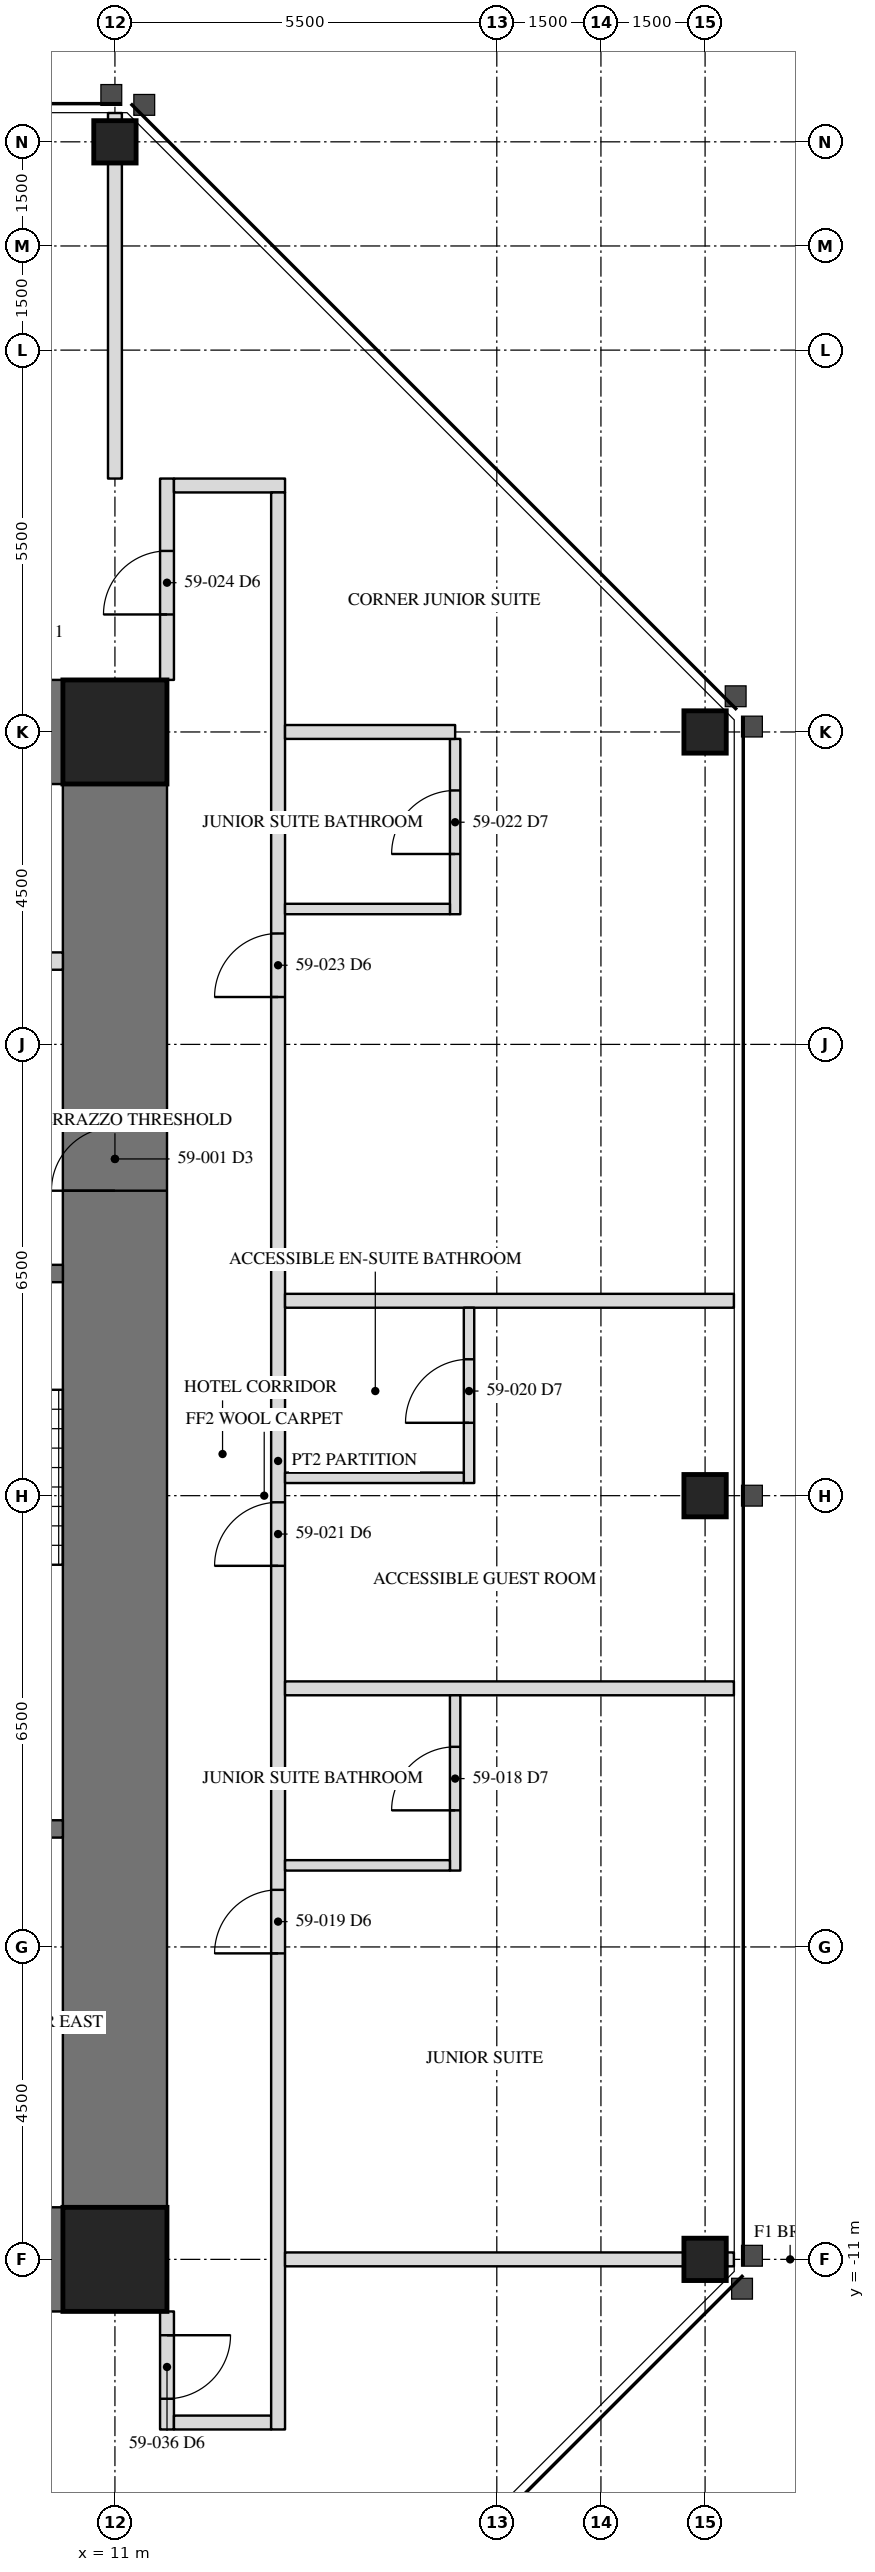
"""IFC4 building model, lengths in metres.
Left out: names, types, materials, properties, quantities, classifications, styles, units other than length and angle.
Written with IfcOpenShell. Run it as: python <this file> out.ifc"""

import sys

from ifc_helpers import new_model, si_unit, direction, frame, frame_2d, origin, origin_2d, place, context, subcontext, project, spatial, rectangle, hollow_rectangle, extrude, element, fill, save


model = new_model("IFC4")
c1 = context("Model", 3, precision=1e-05, world=origin(), true_north=direction((0.0, 1.0)))
c2 = subcontext(c1, "Body", "Model", "MODEL_VIEW")
j1 = project(units=[si_unit("LENGTHUNIT", "METRE"), si_unit("PLANEANGLEUNIT", "RADIAN")], contexts=[c1])
p1 = place(None, origin())
s1 = spatial("IfcSite", under=j1, at=p1, CompositionType="ELEMENT")
p2 = place(p1, origin())
s2 = spatial("IfcBuilding", under=s1, at=p2, CompositionType="ELEMENT")
p3 = place(p2, frame((0.0, 0.0, 243.2)))
s3 = spatial("IfcBuildingStorey", under=s2, at=p3, CompositionType="ELEMENT", Elevation=243.2)
for number, where, z_axis, x_axis in (
    (1, (19.5, -11.0, 0.0), (0.0, 0.0, 1.0), (0.0, 1.0, 0.0)),
    (2, (19.5, 0.0, 0.0), (0.0, 0.0, 1.0), (0.0, 1.0, 0.0)),
    (3, (19.5, 11.0, 0.0), (0.0, 0.0, 1.0), (0.0, 1.0, 0.0)),
    (4, (11.0, 19.5, 0.0), (0.0, 0.0, 1.0), (1.0, 0.0, 0.0)),
):
    element("IfcColumn", number, at=place(p3, frame(where, z_axis=z_axis, x_axis=x_axis)), inside=s3, PredefinedType="COLUMN", context=c2, shape_type="SweptSolid", body=[
        extrude(hollow_rectangle(XDim=0.61, YDim=0.61, WallThickness=0.051, at=origin_2d()), origin(), (0.0, 0.0, 1.0), 3.5),
    ])
p4 = place(p3, frame((11.0, -11.0, 0.0), z_axis=(0.0, 0.0, 1.0), x_axis=(0.0, 1.0, 0.0)))
e5 = element("IfcWall", 5, at=p4, inside=s3, PredefinedType="SHEAR", context=c2, shape_type="SweptSolid", body=[
    extrude(rectangle(XDim=22.0, YDim=1.5, at=frame_2d((11.0, 0.0))), origin(), (0.0, 0.0, 1.0), 3.5),
])
p5 = place(p4, frame((15.393, 0.0, 0.0)))
e6 = element("IfcOpeningElement", 6, at=p5, cuts=e5, PredefinedType="OPENING", context=c2, shape_type="SweptSolid", body=[
    extrude(rectangle(XDim=0.915, YDim=2.134, at=frame_2d((0.458, 1.067))), frame((0.0, 0.76, 0.0), z_axis=(0.0, -1.0, 0.0), x_axis=(1.0, 0.0, 0.0)), (0.0, 0.0, 1.0), 1.52),
])
for number, where, z_axis, x_axis in (
    (7, (11.0, 11.0, 0.0), (0.0, 0.0, 1.0), (-1.0, 0.0, 0.0)),
    (8, (6.5, -11.0, 0.0), (0.0, 0.0, 1.0), (1.0, 0.0, 0.0)),
):
    element("IfcWall", number, at=place(p3, frame(where, z_axis=z_axis, x_axis=x_axis)), inside=s3, PredefinedType="SHEAR", context=c2, shape_type="SweptSolid", body=[
        extrude(rectangle(XDim=4.5, YDim=1.5, at=frame_2d((2.25, 0.0))), origin(), (0.0, 0.0, 1.0), 3.5),
    ])
for number, where, z_axis, x_axis in (
    (9, (11.0, 11.0, 0.0), (0.0, 0.0, 1.0), (1.0, 0.0, 0.0)),
    (10, (11.0, -11.0, 0.0), (0.0, 0.0, 1.0), (1.0, 0.0, 0.0)),
):
    element("IfcColumn", number, at=place(p3, frame(where, z_axis=z_axis, x_axis=x_axis)), inside=s3, PredefinedType="COLUMN", context=c2, shape_type="SweptSolid", body=[
        extrude(hollow_rectangle(XDim=1.499, YDim=1.499, WallThickness=0.102, at=origin_2d()), origin(), (0.0, 0.0, 1.0), 3.5),
    ])
p6 = place(p3, frame((6.95, -4.8, 0.0), z_axis=(0.0, 0.0, 1.0), x_axis=(1.0, 0.0, 0.0)))
e11 = element("IfcWall", 11, at=p6, inside=s3, PredefinedType="SOLIDWALL", context=c2, shape_type="SweptSolid", body=[
    extrude(rectangle(XDim=3.3, YDim=0.25, at=frame_2d((1.65, 0.0))), origin(), (0.0, 0.0, 1.0), 3.31),
])
p7 = place(p3, frame((6.95, 3.2, 0.0), z_axis=(0.0, 0.0, 1.0), x_axis=(1.0, 0.0, 0.0)))
e12 = element("IfcWall", 12, at=p7, inside=s3, PredefinedType="SOLIDWALL", context=c2, shape_type="SweptSolid", body=[
    extrude(rectangle(XDim=3.3, YDim=0.25, at=frame_2d((1.65, 0.0))), origin(), (0.0, 0.0, 1.0), 3.31),
])
p8 = place(p7, frame((1.116, 0.0, 0.0)))
e13 = element("IfcOpeningElement", 13, at=p8, cuts=e12, PredefinedType="OPENING", context=c2, shape_type="SweptSolid", body=[
    extrude(rectangle(XDim=1.067, YDim=2.134, at=frame_2d((0.533, 1.067))), frame((0.0, 0.135, 0.0), z_axis=(0.0, -1.0, 0.0), x_axis=(1.0, 0.0, 0.0)), (0.0, 0.0, 1.0), 0.27),
])
p9 = place(p3, frame((6.95, 7.7, 0.0), z_axis=(0.0, 0.0, 1.0), x_axis=(1.0, 0.0, 0.0)))
e14 = element("IfcWall", 14, at=p9, inside=s3, PredefinedType="PARTITIONING", context=c2, shape_type="SweptSolid", body=[
    extrude(rectangle(XDim=3.3, YDim=0.25, at=frame_2d((1.65, 0.0))), origin(), (0.0, 0.0, 1.0), 3.31),
])
p10 = place(p9, frame((0.45, 0.0, 0.0)))
e15 = element("IfcOpeningElement", 15, at=p10, cuts=e14, PredefinedType="OPENING", context=c2, shape_type="SweptSolid", body=[
    extrude(rectangle(XDim=1.219, YDim=2.134, at=frame_2d((0.609, 1.067))), frame((0.0, 0.135, 0.0), z_axis=(0.0, -1.0, 0.0), x_axis=(1.0, 0.0, 0.0)), (0.0, 0.0, 1.0), 0.27),
])
p11 = place(p3, frame((11.75, 11.75, 0.0), z_axis=(0.0, 0.0, 1.0), x_axis=(0.0, 1.0, 0.0)))
e16 = element("IfcWall", 16, at=p11, inside=s3, PredefinedType="PARTITIONING", context=c2, shape_type="SweptSolid", body=[
    extrude(rectangle(XDim=2.9, YDim=0.2, at=frame_2d((1.45, 0.0))), origin(), (0.0, 0.0, 1.0), 3.31),
])
p12 = place(p11, frame((0.942, 0.0, 0.0)))
e17 = element("IfcOpeningElement", 17, at=p12, cuts=e16, PredefinedType="OPENING", context=c2, shape_type="SweptSolid", body=[
    extrude(rectangle(XDim=0.915, YDim=2.134, at=frame_2d((0.458, 1.067))), frame((0.0, 0.11, 0.0), z_axis=(0.0, -1.0, 0.0), x_axis=(1.0, 0.0, 0.0)), (0.0, 0.0, 1.0), 0.22),
])
p13 = place(p3, frame((13.45, 14.55, 0.0), z_axis=(0.0, 0.0, 1.0), x_axis=(-1.0, 0.0, 0.0)))
e18 = element("IfcWall", 18, at=p13, inside=s3, PredefinedType="PARTITIONING", context=c2, shape_type="SweptSolid", body=[
    extrude(rectangle(XDim=1.6, YDim=0.2, at=frame_2d((0.8, 0.0))), origin(), (0.0, 0.0, 1.0), 3.31),
])
p14 = place(p3, frame((11.75, -11.75, 0.0), z_axis=(0.0, 0.0, 1.0), x_axis=(0.0, -1.0, 0.0)))
e19 = element("IfcWall", 19, at=p14, inside=s3, PredefinedType="PARTITIONING", context=c2, shape_type="SweptSolid", body=[
    extrude(rectangle(XDim=1.7, YDim=0.2, at=frame_2d((0.85, 0.0))), origin(), (0.0, 0.0, 1.0), 3.31),
])
p15 = place(p14, frame((0.343, 0.0, 0.0)))
e20 = element("IfcOpeningElement", 20, at=p15, cuts=e19, PredefinedType="OPENING", context=c2, shape_type="SweptSolid", body=[
    extrude(rectangle(XDim=0.915, YDim=2.134, at=frame_2d((0.458, 1.067))), frame((0.0, 0.11, 0.0), z_axis=(0.0, -1.0, 0.0), x_axis=(1.0, 0.0, 0.0)), (0.0, 0.0, 1.0), 0.22),
])
p16 = place(p3, frame((11.85, -13.35, 0.0), z_axis=(0.0, 0.0, 1.0), x_axis=(1.0, 0.0, 0.0)))
e21 = element("IfcWall", 21, at=p16, inside=s3, PredefinedType="PARTITIONING", context=c2, shape_type="SweptSolid", body=[
    extrude(rectangle(XDim=1.4, YDim=0.2, at=frame_2d((0.7, 0.0))), origin(), (0.0, 0.0, 1.0), 3.31),
])
p17 = place(p3, frame((13.35, -13.45, 0.0), z_axis=(0.0, 0.0, 1.0), x_axis=(0.0, 1.0, 0.0)))
e22 = element("IfcWall", 22, at=p17, inside=s3, PredefinedType="PARTITIONING", context=c2, shape_type="SweptSolid", body=[
    extrude(rectangle(XDim=27.9, YDim=0.2, at=frame_2d((13.95, 0.0))), origin(), (0.0, 0.0, 1.0), 3.31),
])
p18 = place(p17, frame((6.857, 0.0, 0.0)))
e23 = element("IfcOpeningElement", 23, at=p18, cuts=e22, PredefinedType="OPENING", context=c2, shape_type="SweptSolid", body=[
    extrude(rectangle(XDim=0.915, YDim=2.134, at=frame_2d((0.458, 1.067))), frame((0.0, 0.11, 0.0), z_axis=(0.0, -1.0, 0.0), x_axis=(1.0, 0.0, 0.0)), (0.0, 0.0, 1.0), 0.22),
])
p19 = place(p17, frame((12.439, 0.0, 0.0)))
e24 = element("IfcOpeningElement", 24, at=p19, cuts=e22, PredefinedType="OPENING", context=c2, shape_type="SweptSolid", body=[
    extrude(rectangle(XDim=0.915, YDim=2.134, at=frame_2d((0.458, 1.067))), frame((0.0, 0.11, 0.0), z_axis=(0.0, -1.0, 0.0), x_axis=(1.0, 0.0, 0.0)), (0.0, 0.0, 1.0), 0.22),
])
p20 = place(p17, frame((20.633, 0.0, 0.0)))
e25 = element("IfcOpeningElement", 25, at=p20, cuts=e22, PredefinedType="OPENING", context=c2, shape_type="SweptSolid", body=[
    extrude(rectangle(XDim=0.915, YDim=2.134, at=frame_2d((0.458, 1.067))), frame((0.0, 0.11, 0.0), z_axis=(0.0, -1.0, 0.0), x_axis=(1.0, 0.0, 0.0)), (0.0, 0.0, 1.0), 0.22),
])
p21 = place(p3, frame((13.45, -11.0, 0.0), z_axis=(0.0, 0.0, 1.0), x_axis=(1.0, 0.0, 0.0)))
e26 = element("IfcWall", 26, at=p21, inside=s3, PredefinedType="PARTITIONING", context=c2, shape_type="SweptSolid", body=[
    extrude(rectangle(XDim=6.465, YDim=0.2, at=frame_2d((3.232, 0.0))), origin(), (0.0, 0.0, 1.0), 2.802),
])
for number, where, z_axis, x_axis in (
    (27, (13.45, -2.775, 0.0), (0.0, 0.0, 1.0), (1.0, 0.0, 0.0)),
    (28, (13.45, 2.807, 0.0), (0.0, 0.0, 1.0), (1.0, 0.0, 0.0)),
):
    element("IfcWall", number, at=place(p3, frame(where, z_axis=z_axis, x_axis=x_axis)), inside=s3, PredefinedType="PARTITIONING", context=c2, shape_type="SweptSolid", body=[
        extrude(rectangle(XDim=6.465, YDim=0.2, at=frame_2d((3.232, 0.0))), origin(), (0.0, 0.0, 1.0), 3.31),
    ])
p22 = place(p3, frame((15.9, -5.4, 0.0), z_axis=(0.0, 0.0, 1.0), x_axis=(0.0, 1.0, 0.0)))
e29 = element("IfcWall", 29, at=p22, inside=s3, PredefinedType="PARTITIONING", context=c2, shape_type="SweptSolid", body=[
    extrude(rectangle(XDim=2.525, YDim=0.15, at=frame_2d((1.262, 0.0))), origin(), (0.0, 0.0, 1.0), 3.31),
])
p23 = place(p22, frame((0.867, 0.0, 0.0)))
e30 = element("IfcOpeningElement", 30, at=p23, cuts=e29, PredefinedType="OPENING", context=c2, shape_type="SweptSolid", body=[
    extrude(rectangle(XDim=0.915, YDim=2.032, at=frame_2d((0.458, 1.016))), frame((0.0, 0.085, 0.0), z_axis=(0.0, -1.0, 0.0), x_axis=(1.0, 0.0, 0.0)), (0.0, 0.0, 1.0), 0.17),
])
p24 = place(p3, frame((13.45, -5.325, 0.0), z_axis=(0.0, 0.0, 1.0), x_axis=(1.0, 0.0, 0.0)))
e31 = element("IfcWall", 31, at=p24, inside=s3, PredefinedType="PARTITIONING", context=c2, shape_type="SweptSolid", body=[
    extrude(rectangle(XDim=2.375, YDim=0.15, at=frame_2d((1.188, 0.0))), origin(), (0.0, 0.0, 1.0), 3.31),
])
p25 = place(p3, frame((16.1, 0.182, 0.0), z_axis=(0.0, 0.0, 1.0), x_axis=(0.0, 1.0, 0.0)))
e32 = element("IfcWall", 32, at=p25, inside=s3, PredefinedType="PARTITIONING", context=c2, shape_type="SweptSolid", body=[
    extrude(rectangle(XDim=2.525, YDim=0.15, at=frame_2d((1.263, 0.0))), origin(), (0.0, 0.0, 1.0), 3.31),
])
p26 = place(p25, frame((0.867, 0.0, 0.0)))
e33 = element("IfcOpeningElement", 33, at=p26, cuts=e32, PredefinedType="OPENING", context=c2, shape_type="SweptSolid", body=[
    extrude(rectangle(XDim=0.915, YDim=2.032, at=frame_2d((0.458, 1.016))), frame((0.0, 0.085, 0.0), z_axis=(0.0, -1.0, 0.0), x_axis=(1.0, 0.0, 0.0)), (0.0, 0.0, 1.0), 0.17),
])
p27 = place(p3, frame((13.45, 0.257, 0.0), z_axis=(0.0, 0.0, 1.0), x_axis=(1.0, 0.0, 0.0)))
e34 = element("IfcWall", 34, at=p27, inside=s3, PredefinedType="PARTITIONING", context=c2, shape_type="SweptSolid", body=[
    extrude(rectangle(XDim=2.575, YDim=0.15, at=frame_2d((1.288, 0.0))), origin(), (0.0, 0.0, 1.0), 3.31),
])
p28 = place(p3, frame((15.9, 8.375, 0.0), z_axis=(0.0, 0.0, 1.0), x_axis=(0.0, 1.0, 0.0)))
e35 = element("IfcWall", 35, at=p28, inside=s3, PredefinedType="PARTITIONING", context=c2, shape_type="SweptSolid", body=[
    extrude(rectangle(XDim=2.525, YDim=0.15, at=frame_2d((1.262, 0.0))), origin(), (0.0, 0.0, 1.0), 3.31),
])
p29 = place(p28, frame((0.867, 0.0, 0.0)))
e36 = element("IfcOpeningElement", 36, at=p29, cuts=e35, PredefinedType="OPENING", context=c2, shape_type="SweptSolid", body=[
    extrude(rectangle(XDim=0.915, YDim=2.032, at=frame_2d((0.458, 1.016))), frame((0.0, 0.085, 0.0), z_axis=(0.0, -1.0, 0.0), x_axis=(1.0, 0.0, 0.0)), (0.0, 0.0, 1.0), 0.17),
])
p30 = place(p3, frame((13.45, 8.45, 0.0), z_axis=(0.0, 0.0, 1.0), x_axis=(1.0, 0.0, 0.0)))
e37 = element("IfcWall", 37, at=p30, inside=s3, PredefinedType="PARTITIONING", context=c2, shape_type="SweptSolid", body=[
    extrude(rectangle(XDim=2.375, YDim=0.15, at=frame_2d((1.188, 0.0))), origin(), (0.0, 0.0, 1.0), 3.31),
])
p31 = place(p3, frame((13.45, 11.0, 0.0), z_axis=(0.0, 0.0, 1.0), x_axis=(1.0, 0.0, 0.0)))
e38 = element("IfcWall", 38, at=p31, inside=s3, PredefinedType="PARTITIONING", context=c2, shape_type="SweptSolid", body=[
    extrude(rectangle(XDim=2.45, YDim=0.2, at=frame_2d((1.225, 0.0))), origin(), (0.0, 0.0, 1.0), 2.802),
])
p32 = place(p3, frame((11.0, 14.65, 0.0), z_axis=(0.0, 0.0, 1.0), x_axis=(0.0, 1.0, 0.0)))
e39 = element("IfcWall", 39, at=p32, inside=s3, PredefinedType="PARTITIONING", context=c2, shape_type="SweptSolid", body=[
    extrude(rectangle(XDim=5.265, YDim=0.2, at=frame_2d((2.633, 0.0))), origin(), (0.0, 0.0, 1.0), 2.802),
])
p33 = place(p5, origin())
e40 = element("IfcDoor", 40, at=p33, inside=s3, OperationType="SINGLE_SWING_RIGHT", PredefinedType="DOOR", context=c2, shape_type="SweptSolid", body=[
    extrude(rectangle(XDim=0.915, YDim=2.134, at=frame_2d((0.458, 1.067))), frame((0.0, -0.675, 0.0), z_axis=(0.0, -1.0, 0.0), x_axis=(1.0, 0.0, 0.0)), (0.0, 0.0, 1.0), 0.05),
])
fill(e6, e40)
p34 = place(p23, origin())
e41 = element("IfcDoor", 41, at=p34, inside=s3, OperationType="SINGLE_SWING_LEFT", PredefinedType="DOOR", context=c2, shape_type="SweptSolid", body=[
    extrude(rectangle(XDim=0.915, YDim=2.032, at=frame_2d((0.458, 1.016))), frame((0.0, 0.025, 0.0), z_axis=(0.0, -1.0, 0.0), x_axis=(1.0, 0.0, 0.0)), (0.0, 0.0, 1.0), 0.05),
])
fill(e30, e41)
p35 = place(p18, origin())
e42 = element("IfcDoor", 42, at=p35, inside=s3, OperationType="SINGLE_SWING_LEFT", PredefinedType="DOOR", context=c2, shape_type="SweptSolid", body=[
    extrude(rectangle(XDim=0.915, YDim=2.134, at=frame_2d((0.458, 1.067))), frame((0.0, 0.025, 0.0), z_axis=(0.0, -1.0, 0.0), x_axis=(1.0, 0.0, 0.0)), (0.0, 0.0, 1.0), 0.05),
])
fill(e23, e42)
p36 = place(p26, origin())
e43 = element("IfcDoor", 43, at=p36, inside=s3, OperationType="SINGLE_SWING_LEFT", PredefinedType="DOOR", context=c2, shape_type="SweptSolid", body=[
    extrude(rectangle(XDim=0.915, YDim=2.032, at=frame_2d((0.458, 1.016))), frame((0.0, 0.025, 0.0), z_axis=(0.0, -1.0, 0.0), x_axis=(1.0, 0.0, 0.0)), (0.0, 0.0, 1.0), 0.05),
])
fill(e33, e43)
p37 = place(p19, origin())
e44 = element("IfcDoor", 44, at=p37, inside=s3, OperationType="SINGLE_SWING_LEFT", PredefinedType="DOOR", context=c2, shape_type="SweptSolid", body=[
    extrude(rectangle(XDim=0.915, YDim=2.134, at=frame_2d((0.458, 1.067))), frame((0.0, 0.025, 0.0), z_axis=(0.0, -1.0, 0.0), x_axis=(1.0, 0.0, 0.0)), (0.0, 0.0, 1.0), 0.05),
])
fill(e24, e44)
p38 = place(p29, origin())
e45 = element("IfcDoor", 45, at=p38, inside=s3, OperationType="SINGLE_SWING_LEFT", PredefinedType="DOOR", context=c2, shape_type="SweptSolid", body=[
    extrude(rectangle(XDim=0.915, YDim=2.032, at=frame_2d((0.458, 1.016))), frame((0.0, 0.025, 0.0), z_axis=(0.0, -1.0, 0.0), x_axis=(1.0, 0.0, 0.0)), (0.0, 0.0, 1.0), 0.05),
])
fill(e36, e45)
p39 = place(p20, origin())
e46 = element("IfcDoor", 46, at=p39, inside=s3, OperationType="SINGLE_SWING_LEFT", PredefinedType="DOOR", context=c2, shape_type="SweptSolid", body=[
    extrude(rectangle(XDim=0.915, YDim=2.134, at=frame_2d((0.458, 1.067))), frame((0.0, 0.025, 0.0), z_axis=(0.0, -1.0, 0.0), x_axis=(1.0, 0.0, 0.0)), (0.0, 0.0, 1.0), 0.05),
])
fill(e25, e46)
p40 = place(p12, origin())
e47 = element("IfcDoor", 47, at=p40, inside=s3, OperationType="SINGLE_SWING_LEFT", PredefinedType="DOOR", context=c2, shape_type="SweptSolid", body=[
    extrude(rectangle(XDim=0.915, YDim=2.134, at=frame_2d((0.458, 1.067))), frame((0.0, 0.025, 0.0), z_axis=(0.0, -1.0, 0.0), x_axis=(1.0, 0.0, 0.0)), (0.0, 0.0, 1.0), 0.05),
])
fill(e17, e47)
p41 = place(p15, origin())
e48 = element("IfcDoor", 48, at=p41, inside=s3, OperationType="SINGLE_SWING_LEFT", PredefinedType="DOOR", context=c2, shape_type="SweptSolid", body=[
    extrude(rectangle(XDim=0.915, YDim=2.134, at=frame_2d((0.458, 1.067))), frame((0.0, 0.025, 0.0), z_axis=(0.0, -1.0, 0.0), x_axis=(1.0, 0.0, 0.0)), (0.0, 0.0, 1.0), 0.05),
])
fill(e20, e48)
save(model, sys.argv[1])
